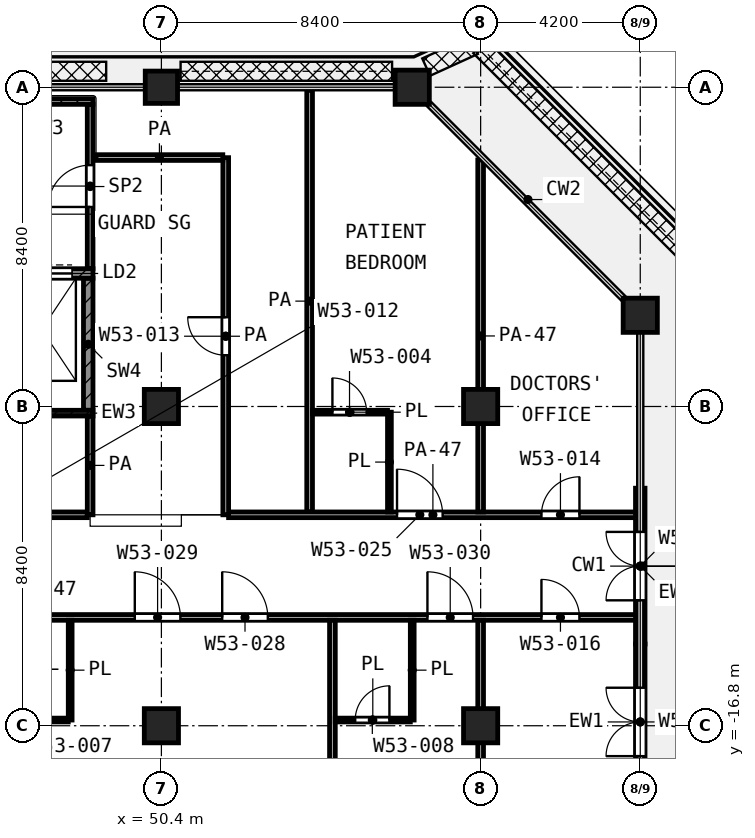
"""IFC4 building model, lengths in metres.
Left out: names, types, materials, properties, quantities, classifications, styles, units other than length and angle.
Written with IfcOpenShell. Run it as: python <this file> out.ifc"""

import sys

from ifc_helpers import new_model, si_unit, direction, frame, frame_2d, origin, origin_2d, place, context, subcontext, project, spatial, rectangle, extrude, element, fill, save


model = new_model("IFC4")
c1 = context("Model", 3, precision=1e-05, world=origin(), true_north=direction((0.0, 1.0)))
c2 = subcontext(c1, "Body", "Model", "MODEL_VIEW")
j1 = project(units=[si_unit("LENGTHUNIT", "METRE"), si_unit("PLANEANGLEUNIT", "RADIAN")], contexts=[c1])
p1 = place(None, origin())
s1 = spatial("IfcSite", under=j1, at=p1, CompositionType="ELEMENT")
p2 = place(p1, origin())
s2 = spatial("IfcBuilding", under=s1, at=p2, CompositionType="ELEMENT")
p3 = place(p2, frame((0.0, 0.0, 251.6)))
s3 = spatial("IfcBuildingStorey", under=s2, at=p3, CompositionType="ELEMENT", Elevation=251.6)
p4 = place(p3, frame((50.4, 0.0, 0.0), z_axis=(0.0, 0.0, 1.0), x_axis=(1.0, 0.0, 0.0)))
e1 = element("IfcColumn", 1, at=p4, inside=s3, PredefinedType="COLUMN", context=c2, shape_type="SweptSolid", body=[
    extrude(rectangle(XDim=0.85, YDim=0.85, at=origin_2d()), origin(), (0.0, 0.0, 1.0), 4.2),
])
for number, where, z_axis, x_axis in (
    (2, (57.0, 0.0, 0.0), (0.0, 0.0, 1.0), (1.0, 0.0, 0.0)),
    (3, (63.0, -6.0, 0.0), (0.0, 0.0, 1.0), (1.0, 0.0, 0.0)),
    (4, (50.4, -8.4, 0.0), (0.0, 0.0, 1.0), (1.0, 0.0, 0.0)),
    (5, (58.8, -8.4, 0.0), (0.0, 0.0, 1.0), (1.0, 0.0, 0.0)),
    (6, (50.4, -16.8, 0.0), (0.0, 0.0, 1.0), (1.0, 0.0, 0.0)),
    (7, (58.8, -16.8, 0.0), (0.0, 0.0, 1.0), (1.0, 0.0, 0.0)),
):
    element("IfcColumn", number, at=place(p3, frame(where, z_axis=z_axis, x_axis=x_axis)), inside=s3, PredefinedType="COLUMN", context=c2, shape_type="SweptSolid", body=[
        extrude(rectangle(XDim=0.9, YDim=0.9, at=origin_2d()), origin(), (0.0, 0.0, 1.0), 4.2),
    ])
p5 = place(p3, frame((63.0, -18.75, 0.0), z_axis=(0.0, 0.0, 1.0), x_axis=(0.0, 1.0, 0.0)))
e8 = element("IfcWall", 8, at=p5, inside=s3, PredefinedType="SOLIDWALL", context=c2, shape_type="SweptSolid", body=[
    extrude(rectangle(XDim=4.1, YDim=0.25, at=frame_2d((2.05, 0.0))), origin(), (0.0, 0.0, 1.0), 2.58),
])
p6 = place(p5, frame((1.15, 0.0, 0.0)))
e9 = element("IfcOpeningElement", 9, at=p6, cuts=e8, PredefinedType="OPENING", context=c2, shape_type="SweptSolid", body=[
    extrude(rectangle(XDim=1.8, YDim=2.1, at=frame_2d((0.9, 1.05))), frame((0.0, 0.135, 0.0), z_axis=(0.0, -1.0, 0.0), x_axis=(1.0, 0.0, 0.0)), (0.0, 0.0, 1.0), 0.27),
])
p7 = place(p3, frame((63.0, -14.65, 0.0), z_axis=(0.0, 0.0, 1.0), x_axis=(0.0, 1.0, 0.0)))
e10 = element("IfcWall", 10, at=p7, inside=s3, PredefinedType="SOLIDWALL", context=c2, shape_type="SweptSolid", body=[
    extrude(rectangle(XDim=4.1, YDim=0.25, at=frame_2d((2.05, 0.0))), origin(), (0.0, 0.0, 1.0), 2.58),
])
p8 = place(p7, frame((1.15, 0.0, 0.0)))
e11 = element("IfcOpeningElement", 11, at=p8, cuts=e10, PredefinedType="OPENING", context=c2, shape_type="SweptSolid", body=[
    extrude(rectangle(XDim=1.8, YDim=2.1, at=frame_2d((0.9, 1.05))), frame((0.0, 0.135, 0.0), z_axis=(0.0, -1.0, 0.0), x_axis=(1.0, 0.0, 0.0)), (0.0, 0.0, 1.0), 0.27),
])
for number, where, z_axis, x_axis in (
    (12, (46.15, -0.375, 0.0), (0.0, 0.0, 1.0), (1.0, 0.0, 0.0)),
    (13, (46.15, -8.575, 0.0), (0.0, 0.0, 1.0), (1.0, 0.0, 0.0)),
):
    element("IfcWall", number, at=place(p3, frame(where, z_axis=z_axis, x_axis=x_axis)), inside=s3, PredefinedType="SHEAR", context=c2, shape_type="SweptSolid", body=[
        extrude(rectangle(XDim=2.45, YDim=0.15, at=frame_2d((1.225, 0.0))), origin(), (0.0, 0.0, 1.0), 3.6),
    ])
p9 = place(p3, frame((46.15, -4.9, 0.0), z_axis=(0.0, 0.0, 1.0), x_axis=(1.0, 0.0, 0.0)))
e14 = element("IfcWall", 14, at=p9, inside=s3, PredefinedType="SHEAR", context=c2, shape_type="SweptSolid", body=[
    extrude(rectangle(XDim=2.45, YDim=0.25, at=frame_2d((1.225, 0.0))), origin(), (0.0, 0.0, 1.0), 3.6),
])
p10 = place(p9, frame((0.6, 0.0, 0.0)))
e15 = element("IfcOpeningElement", 15, at=p10, cuts=e14, PredefinedType="OPENING", context=c2, shape_type="SweptSolid", body=[
    extrude(rectangle(XDim=1.3, YDim=2.1, at=frame_2d((0.65, 1.05))), frame((0.0, 0.135, 0.0), z_axis=(0.0, -1.0, 0.0), x_axis=(1.0, 0.0, 0.0)), (0.0, 0.0, 1.0), 0.27),
])
p11 = place(p3, frame((48.475, -8.5, 0.0), z_axis=(0.0, 0.0, 1.0), x_axis=(0.0, 1.0, 0.0)))
e16 = element("IfcWall", 16, at=p11, inside=s3, PredefinedType="SHEAR", context=c2, shape_type="SweptSolid", body=[
    extrude(rectangle(XDim=3.475, YDim=0.25, at=frame_2d((1.738, 0.0))), origin(), (0.0, 0.0, 1.0), 3.6),
])
p12 = place(p3, frame((48.525, -4.775, 0.0), z_axis=(0.0, 0.0, 1.0), x_axis=(0.0, 1.0, 0.0)))
e17 = element("IfcWall", 17, at=p12, inside=s3, PredefinedType="PARTITIONING", context=c2, shape_type="SweptSolid", body=[
    extrude(rectangle(XDim=4.325, YDim=0.15, at=frame_2d((2.163, 0.0))), origin(), (0.0, 0.0, 1.0), 3.6),
])
p13 = place(p12, frame((1.625, 0.0, 0.0)))
e18 = element("IfcOpeningElement", 18, at=p13, cuts=e17, PredefinedType="OPENING", context=c2, shape_type="SweptSolid", body=[
    extrude(rectangle(XDim=1.1, YDim=2.1, at=frame_2d((0.55, 1.05))), frame((0.0, 0.085, 0.0), z_axis=(0.0, -1.0, 0.0), x_axis=(1.0, 0.0, 0.0)), (0.0, 0.0, 1.0), 0.17),
])
p14 = place(p3, frame((43.85, -16.65, 0.0), z_axis=(0.0, 0.0, 1.0), x_axis=(1.0, 0.0, 0.0)))
e19 = element("IfcWall", 19, at=p14, inside=s3, PredefinedType="PARTITIONING", context=c2, shape_type="SweptSolid", body=[
    extrude(rectangle(XDim=4.1, YDim=0.1, at=frame_2d((2.05, 0.0))), origin(), (0.0, 0.0, 1.0), 3.6),
])
p15 = place(p14, frame((0.55, 0.0, 0.0)))
e20 = element("IfcOpeningElement", 20, at=p15, cuts=e19, PredefinedType="OPENING", context=c2, shape_type="SweptSolid", body=[
    extrude(rectangle(XDim=0.9, YDim=2.1, at=frame_2d((0.45, 1.05))), frame((0.0, 0.06, 0.0), z_axis=(0.0, -1.0, 0.0), x_axis=(1.0, 0.0, 0.0)), (0.0, 0.0, 1.0), 0.12),
])
p16 = place(p14, frame((2.65, 0.0, 0.0)))
e21 = element("IfcOpeningElement", 21, at=p16, cuts=e19, PredefinedType="OPENING", context=c2, shape_type="SweptSolid", body=[
    extrude(rectangle(XDim=0.9, YDim=2.1, at=frame_2d((0.45, 1.05))), frame((0.0, 0.06, 0.0), z_axis=(0.0, -1.0, 0.0), x_axis=(1.0, 0.0, 0.0)), (0.0, 0.0, 1.0), 0.12),
])
p17 = place(p3, frame((54.975, -16.65, 0.0), z_axis=(0.0, 0.0, 1.0), x_axis=(1.0, 0.0, 0.0)))
e22 = element("IfcWall", 22, at=p17, inside=s3, PredefinedType="PARTITIONING", context=c2, shape_type="SweptSolid", body=[
    extrude(rectangle(XDim=1.975, YDim=0.1, at=frame_2d((0.987, 0.0))), origin(), (0.0, 0.0, 1.0), 3.6),
])
p18 = place(p17, frame((0.525, 0.0, 0.0)))
e23 = element("IfcOpeningElement", 23, at=p18, cuts=e22, PredefinedType="OPENING", context=c2, shape_type="SweptSolid", body=[
    extrude(rectangle(XDim=0.9, YDim=2.1, at=frame_2d((0.45, 1.05))), frame((0.0, 0.06, 0.0), z_axis=(0.0, -1.0, 0.0), x_axis=(1.0, 0.0, 0.0)), (0.0, 0.0, 1.0), 0.12),
])
p19 = place(p3, frame((54.375, -8.55, 0.0), z_axis=(0.0, 0.0, 1.0), x_axis=(1.0, 0.0, 0.0)))
e24 = element("IfcWall", 24, at=p19, inside=s3, PredefinedType="PARTITIONING", context=c2, shape_type="SweptSolid", body=[
    extrude(rectangle(XDim=1.975, YDim=0.1, at=frame_2d((0.988, 0.0))), origin(), (0.0, 0.0, 1.0), 3.6),
])
p20 = place(p19, frame((0.525, 0.0, 0.0)))
e25 = element("IfcOpeningElement", 25, at=p20, cuts=e24, PredefinedType="OPENING", context=c2, shape_type="SweptSolid", body=[
    extrude(rectangle(XDim=0.9, YDim=2.1, at=frame_2d((0.45, 1.05))), frame((0.0, 0.06, 0.0), z_axis=(0.0, -1.0, 0.0), x_axis=(1.0, 0.0, 0.0)), (0.0, 0.0, 1.0), 0.12),
])
for number, where, z_axis, x_axis in (
    (26, (48.0, -16.65, 0.0), (0.0, 0.0, 1.0), (0.0, 1.0, 0.0)),
    (27, (56.4, -11.175, 0.0), (0.0, 0.0, 1.0), (0.0, 1.0, 0.0)),
    (28, (57.0, -16.65, 0.0), (0.0, 0.0, 1.0), (0.0, 1.0, 0.0)),
):
    element("IfcWall", number, at=place(p3, frame(where, z_axis=z_axis, x_axis=x_axis)), inside=s3, PredefinedType="PARTITIONING", context=c2, shape_type="SweptSolid", body=[
        extrude(rectangle(XDim=2.625, YDim=0.1, at=frame_2d((1.312, 0.0))), origin(), (0.0, 0.0, 1.0), 3.6),
    ])
p21 = place(p3, frame((29.4, -13.95, 0.0), z_axis=(0.0, 0.0, 1.0), x_axis=(1.0, 0.0, 0.0)))
e29 = element("IfcWall", 29, at=p21, inside=s3, PredefinedType="PARTITIONING", context=c2, shape_type="SweptSolid", body=[
    extrude(rectangle(XDim=33.52, YDim=0.15, at=frame_2d((16.76, 0.0))), origin(), (0.0, 0.0, 1.0), 2.7),
])
p22 = place(p21, frame((1.5, 0.0, 0.0)))
e30 = element("IfcOpeningElement", 30, at=p22, cuts=e29, PredefinedType="OPENING", context=c2, shape_type="SweptSolid", body=[
    extrude(rectangle(XDim=1.2, YDim=2.1, at=frame_2d((0.6, 1.05))), frame((0.0, 0.085, 0.0), z_axis=(0.0, -1.0, 0.0), x_axis=(1.0, 0.0, 0.0)), (0.0, 0.0, 1.0), 0.17),
])
p23 = place(p21, frame((6.1, 0.0, 0.0)))
e31 = element("IfcOpeningElement", 31, at=p23, cuts=e29, PredefinedType="OPENING", context=c2, shape_type="SweptSolid", body=[
    extrude(rectangle(XDim=1.0, YDim=2.1, at=frame_2d((0.5, 1.05))), frame((0.0, 0.085, 0.0), z_axis=(0.0, -1.0, 0.0), x_axis=(1.0, 0.0, 0.0)), (0.0, 0.0, 1.0), 0.17),
])
p24 = place(p21, frame((11.3, 0.0, 0.0)))
e32 = element("IfcOpeningElement", 32, at=p24, cuts=e29, PredefinedType="OPENING", context=c2, shape_type="SweptSolid", body=[
    extrude(rectangle(XDim=1.1, YDim=2.1, at=frame_2d((0.55, 1.05))), frame((0.0, 0.085, 0.0), z_axis=(0.0, -1.0, 0.0), x_axis=(1.0, 0.0, 0.0)), (0.0, 0.0, 1.0), 0.17),
])
p25 = place(p21, frame((13.0, 0.0, 0.0)))
e33 = element("IfcOpeningElement", 33, at=p25, cuts=e29, PredefinedType="OPENING", context=c2, shape_type="SweptSolid", body=[
    extrude(rectangle(XDim=1.2, YDim=2.1, at=frame_2d((0.6, 1.05))), frame((0.0, 0.085, 0.0), z_axis=(0.0, -1.0, 0.0), x_axis=(1.0, 0.0, 0.0)), (0.0, 0.0, 1.0), 0.17),
])
p26 = place(p21, frame((22.6, 0.0, 0.0)))
e34 = element("IfcOpeningElement", 34, at=p26, cuts=e29, PredefinedType="OPENING", context=c2, shape_type="SweptSolid", body=[
    extrude(rectangle(XDim=1.2, YDim=2.1, at=frame_2d((0.6, 1.05))), frame((0.0, 0.085, 0.0), z_axis=(0.0, -1.0, 0.0), x_axis=(1.0, 0.0, 0.0)), (0.0, 0.0, 1.0), 0.17),
])
p27 = place(p21, frame((20.3, 0.0, 0.0)))
e35 = element("IfcOpeningElement", 35, at=p27, cuts=e29, PredefinedType="OPENING", context=c2, shape_type="SweptSolid", body=[
    extrude(rectangle(XDim=1.2, YDim=2.1, at=frame_2d((0.6, 1.05))), frame((0.0, 0.085, 0.0), z_axis=(0.0, -1.0, 0.0), x_axis=(1.0, 0.0, 0.0)), (0.0, 0.0, 1.0), 0.17),
])
p28 = place(p21, frame((28.0, 0.0, 0.0)))
e36 = element("IfcOpeningElement", 36, at=p28, cuts=e29, PredefinedType="OPENING", context=c2, shape_type="SweptSolid", body=[
    extrude(rectangle(XDim=1.2, YDim=2.1, at=frame_2d((0.6, 1.05))), frame((0.0, 0.085, 0.0), z_axis=(0.0, -1.0, 0.0), x_axis=(1.0, 0.0, 0.0)), (0.0, 0.0, 1.0), 0.17),
])
p29 = place(p21, frame((31.0, 0.0, 0.0)))
e37 = element("IfcOpeningElement", 37, at=p29, cuts=e29, PredefinedType="OPENING", context=c2, shape_type="SweptSolid", body=[
    extrude(rectangle(XDim=1.0, YDim=2.1, at=frame_2d((0.5, 1.05))), frame((0.0, 0.085, 0.0), z_axis=(0.0, -1.0, 0.0), x_axis=(1.0, 0.0, 0.0)), (0.0, 0.0, 1.0), 0.17),
])
p30 = place(p3, frame((43.075, -11.25, 0.0), z_axis=(0.0, 0.0, 1.0), x_axis=(1.0, 0.0, 0.0)))
e38 = element("IfcWall", 38, at=p30, inside=s3, PredefinedType="PARTITIONING", context=c2, shape_type="SweptSolid", body=[
    extrude(rectangle(XDim=5.375, YDim=0.15, at=frame_2d((2.688, 0.0))), origin(), (0.0, 0.0, 1.0), 3.6),
])
p31 = place(p30, frame((2.188, 0.0, 0.0)))
e39 = element("IfcOpeningElement", 39, at=p31, cuts=e38, PredefinedType="OPENING", context=c2, shape_type="SweptSolid", body=[
    extrude(rectangle(XDim=1.0, YDim=2.1, at=frame_2d((0.5, 1.05))), frame((0.0, 0.085, 0.0), z_axis=(0.0, -1.0, 0.0), x_axis=(1.0, 0.0, 0.0)), (0.0, 0.0, 1.0), 0.17),
])
p32 = place(p3, frame((52.168, -11.25, 0.0), z_axis=(0.0, 0.0, 1.0), x_axis=(1.0, 0.0, 0.0)))
e40 = element("IfcWall", 40, at=p32, inside=s3, PredefinedType="PARTITIONING", context=c2, shape_type="SweptSolid", body=[
    extrude(rectangle(XDim=10.752, YDim=0.15, at=frame_2d((5.376, 0.0))), origin(), (0.0, 0.0, 1.0), 2.7),
])
p33 = place(p32, frame((4.432, 0.0, 0.0)))
e41 = element("IfcOpeningElement", 41, at=p33, cuts=e40, PredefinedType="OPENING", context=c2, shape_type="SweptSolid", body=[
    extrude(rectangle(XDim=1.2, YDim=2.1, at=frame_2d((0.6, 1.05))), frame((0.0, 0.085, 0.0), z_axis=(0.0, -1.0, 0.0), x_axis=(1.0, 0.0, 0.0)), (0.0, 0.0, 1.0), 0.17),
])
p34 = place(p32, frame((8.232, 0.0, 0.0)))
e42 = element("IfcOpeningElement", 42, at=p34, cuts=e40, PredefinedType="OPENING", context=c2, shape_type="SweptSolid", body=[
    extrude(rectangle(XDim=1.0, YDim=2.1, at=frame_2d((0.5, 1.05))), frame((0.0, 0.085, 0.0), z_axis=(0.0, -1.0, 0.0), x_axis=(1.0, 0.0, 0.0)), (0.0, 0.0, 1.0), 0.17),
])
p35 = place(p3, frame((48.68, -1.85, 0.0), z_axis=(0.0, 0.0, 1.0), x_axis=(1.0, 0.0, 0.0)))
e43 = element("IfcWall", 43, at=p35, inside=s3, PredefinedType="PARTITIONING", context=c2, shape_type="SweptSolid", body=[
    extrude(rectangle(XDim=3.336, YDim=0.15, at=frame_2d((1.668, 0.0))), origin(), (0.0, 0.0, 1.0), 3.6),
])
p36 = place(p3, frame((48.525, -11.25, 0.0), z_axis=(0.0, 0.0, 1.0), x_axis=(0.0, 1.0, 0.0)))
e44 = element("IfcWall", 44, at=p36, inside=s3, PredefinedType="PARTITIONING", context=c2, shape_type="SweptSolid", body=[
    extrude(rectangle(XDim=2.6, YDim=0.15, at=frame_2d((1.3, 0.0))), origin(), (0.0, 0.0, 1.0), 3.6),
])
p37 = place(p3, frame((52.093, -11.25, 0.0), z_axis=(0.0, 0.0, 1.0), x_axis=(0.0, 1.0, 0.0)))
e45 = element("IfcWall", 45, at=p37, inside=s3, PredefinedType="PARTITIONING", context=c2, shape_type="SweptSolid", body=[
    extrude(rectangle(XDim=9.397, YDim=0.15, at=frame_2d((4.698, 0.0))), origin(), (0.0, 0.0, 1.0), 3.6),
])
p38 = place(p37, frame((4.199, 0.0, 0.0)))
e46 = element("IfcOpeningElement", 46, at=p38, cuts=e45, PredefinedType="OPENING", context=c2, shape_type="SweptSolid", body=[
    extrude(rectangle(XDim=1.0, YDim=2.1, at=frame_2d((0.5, 1.05))), frame((0.0, 0.085, 0.0), z_axis=(0.0, -1.0, 0.0), x_axis=(1.0, 0.0, 0.0)), (0.0, 0.0, 1.0), 0.17),
])
p39 = place(p3, frame((54.3, -11.175, 0.0), z_axis=(0.0, 0.0, 1.0), x_axis=(0.0, 1.0, 0.0)))
e47 = element("IfcWall", 47, at=p39, inside=s3, PredefinedType="PARTITIONING", context=c2, shape_type="SweptSolid", body=[
    extrude(rectangle(XDim=11.095, YDim=0.15, at=frame_2d((5.547, 0.0))), origin(), (0.0, 0.0, 1.0), 3.6),
])
p40 = place(p3, frame((54.9, -25.12, 0.0), z_axis=(0.0, 0.0, 1.0), x_axis=(0.0, 1.0, 0.0)))
e48 = element("IfcWall", 48, at=p40, inside=s3, PredefinedType="PARTITIONING", context=c2, shape_type="SweptSolid", body=[
    extrude(rectangle(XDim=11.095, YDim=0.15, at=frame_2d((5.548, 0.0))), origin(), (0.0, 0.0, 1.0), 3.6),
])
p41 = place(p3, frame((58.8, -23.287, 0.0), z_axis=(0.0, 0.0, 1.0), x_axis=(0.0, 1.0, 0.0)))
e49 = element("IfcWall", 49, at=p41, inside=s3, PredefinedType="PARTITIONING", context=c2, shape_type="SweptSolid", body=[
    extrude(rectangle(XDim=9.262, YDim=0.15, at=frame_2d((4.631, 0.0))), origin(), (0.0, 0.0, 1.0), 2.7),
])
p42 = place(p3, frame((58.8, -11.175, 0.0), z_axis=(0.0, 0.0, 1.0), x_axis=(0.0, 1.0, 0.0)))
e50 = element("IfcWall", 50, at=p42, inside=s3, PredefinedType="PARTITIONING", context=c2, shape_type="SweptSolid", body=[
    extrude(rectangle(XDim=9.262, YDim=0.15, at=frame_2d((4.631, 0.0))), origin(), (0.0, 0.0, 1.0), 2.7),
])
p43 = place(p6, origin())
e51 = element("IfcDoor", 51, at=p43, inside=s3, OperationType="DOUBLE_DOOR_SINGLE_SWING", PredefinedType="DOOR", context=c2, shape_type="SweptSolid", body=[
    extrude(rectangle(XDim=1.8, YDim=2.1, at=frame_2d((0.9, 1.05))), frame((0.0, 0.025, 0.0), z_axis=(0.0, -1.0, 0.0), x_axis=(1.0, 0.0, 0.0)), (0.0, 0.0, 1.0), 0.05),
])
fill(e9, e51)
p44 = place(p8, origin())
e52 = element("IfcDoor", 52, at=p44, inside=s3, OperationType="DOUBLE_DOOR_SINGLE_SWING", PredefinedType="DOOR", context=c2, shape_type="SweptSolid", body=[
    extrude(rectangle(XDim=1.8, YDim=2.1, at=frame_2d((0.9, 1.05))), frame((0.0, 0.025, 0.0), z_axis=(0.0, -1.0, 0.0), x_axis=(1.0, 0.0, 0.0)), (0.0, 0.0, 1.0), 0.05),
])
fill(e11, e52)
p45 = place(p10, origin())
e53 = element("IfcDoor", 53, at=p45, inside=s3, OperationType="DOUBLE_DOOR_SLIDING", PredefinedType="DOOR", context=c2, shape_type="SweptSolid", body=[
    extrude(rectangle(XDim=1.3, YDim=2.1, at=frame_2d((0.65, 1.05))), frame((0.0, 0.025, 0.0), z_axis=(0.0, -1.0, 0.0), x_axis=(1.0, 0.0, 0.0)), (0.0, 0.0, 1.0), 0.05),
])
fill(e15, e53)
p46 = place(p13, origin())
e54 = element("IfcDoor", 54, at=p46, inside=s3, OperationType="SINGLE_SWING_LEFT", PredefinedType="DOOR", context=c2, shape_type="SweptSolid", body=[
    extrude(rectangle(XDim=1.1, YDim=2.1, at=frame_2d((0.55, 1.05))), frame((0.0, 0.025, 0.0), z_axis=(0.0, -1.0, 0.0), x_axis=(1.0, 0.0, 0.0)), (0.0, 0.0, 1.0), 0.05),
])
fill(e18, e54)
p47 = place(p38, origin())
e55 = element("IfcDoor", 55, at=p47, inside=s3, OperationType="SINGLE_SWING_RIGHT", PredefinedType="DOOR", context=c2, shape_type="SweptSolid", body=[
    extrude(rectangle(XDim=1.0, YDim=2.1, at=frame_2d((0.5, 1.05))), frame((0.0, 0.025, 0.0), z_axis=(0.0, -1.0, 0.0), x_axis=(1.0, 0.0, 0.0)), (0.0, 0.0, 1.0), 0.05),
])
fill(e46, e55)
p48 = place(p33, origin())
e56 = element("IfcDoor", 56, at=p48, inside=s3, OperationType="SINGLE_SWING_LEFT", PredefinedType="DOOR", context=c2, shape_type="SweptSolid", body=[
    extrude(rectangle(XDim=1.2, YDim=2.1, at=frame_2d((0.6, 1.05))), frame((0.0, 0.025, 0.0), z_axis=(0.0, -1.0, 0.0), x_axis=(1.0, 0.0, 0.0)), (0.0, 0.0, 1.0), 0.05),
])
fill(e41, e56)
p49 = place(p20, origin())
e57 = element("IfcDoor", 57, at=p49, inside=s3, OperationType="SINGLE_SWING_LEFT", PredefinedType="DOOR", context=c2, shape_type="SweptSolid", body=[
    extrude(rectangle(XDim=0.9, YDim=2.1, at=frame_2d((0.45, 1.05))), frame((0.0, 0.025, 0.0), z_axis=(0.0, -1.0, 0.0), x_axis=(1.0, 0.0, 0.0)), (0.0, 0.0, 1.0), 0.05),
])
fill(e25, e57)
p50 = place(p34, origin())
e58 = element("IfcDoor", 58, at=p50, inside=s3, OperationType="SINGLE_SWING_RIGHT", PredefinedType="DOOR", context=c2, shape_type="SweptSolid", body=[
    extrude(rectangle(XDim=1.0, YDim=2.1, at=frame_2d((0.5, 1.05))), frame((0.0, 0.025, 0.0), z_axis=(0.0, -1.0, 0.0), x_axis=(1.0, 0.0, 0.0)), (0.0, 0.0, 1.0), 0.05),
])
fill(e42, e58)
p51 = place(p26, origin())
e59 = element("IfcDoor", 59, at=p51, inside=s3, OperationType="SINGLE_SWING_LEFT", PredefinedType="DOOR", context=c2, shape_type="SweptSolid", body=[
    extrude(rectangle(XDim=1.2, YDim=2.1, at=frame_2d((0.6, 1.05))), frame((0.0, 0.025, 0.0), z_axis=(0.0, -1.0, 0.0), x_axis=(1.0, 0.0, 0.0)), (0.0, 0.0, 1.0), 0.05),
])
fill(e34, e59)
p52 = place(p27, origin())
e60 = element("IfcDoor", 60, at=p52, inside=s3, OperationType="SINGLE_SWING_LEFT", PredefinedType="DOOR", context=c2, shape_type="SweptSolid", body=[
    extrude(rectangle(XDim=1.2, YDim=2.1, at=frame_2d((0.6, 1.05))), frame((0.0, 0.025, 0.0), z_axis=(0.0, -1.0, 0.0), x_axis=(1.0, 0.0, 0.0)), (0.0, 0.0, 1.0), 0.05),
])
fill(e35, e60)
p53 = place(p28, origin())
e61 = element("IfcDoor", 61, at=p53, inside=s3, OperationType="SINGLE_SWING_LEFT", PredefinedType="DOOR", context=c2, shape_type="SweptSolid", body=[
    extrude(rectangle(XDim=1.2, YDim=2.1, at=frame_2d((0.6, 1.05))), frame((0.0, 0.025, 0.0), z_axis=(0.0, -1.0, 0.0), x_axis=(1.0, 0.0, 0.0)), (0.0, 0.0, 1.0), 0.05),
])
fill(e36, e61)
p54 = place(p18, origin())
e62 = element("IfcDoor", 62, at=p54, inside=s3, OperationType="SINGLE_SWING_RIGHT", PredefinedType="DOOR", context=c2, shape_type="SweptSolid", body=[
    extrude(rectangle(XDim=0.9, YDim=2.1, at=frame_2d((0.45, 1.05))), frame((0.0, 0.025, 0.0), z_axis=(0.0, -1.0, 0.0), x_axis=(1.0, 0.0, 0.0)), (0.0, 0.0, 1.0), 0.05),
])
fill(e23, e62)
p55 = place(p29, origin())
e63 = element("IfcDoor", 63, at=p55, inside=s3, OperationType="SINGLE_SWING_LEFT", PredefinedType="DOOR", context=c2, shape_type="SweptSolid", body=[
    extrude(rectangle(XDim=1.0, YDim=2.1, at=frame_2d((0.5, 1.05))), frame((0.0, 0.025, 0.0), z_axis=(0.0, -1.0, 0.0), x_axis=(1.0, 0.0, 0.0)), (0.0, 0.0, 1.0), 0.05),
])
fill(e37, e63)
save(model, sys.argv[1])
